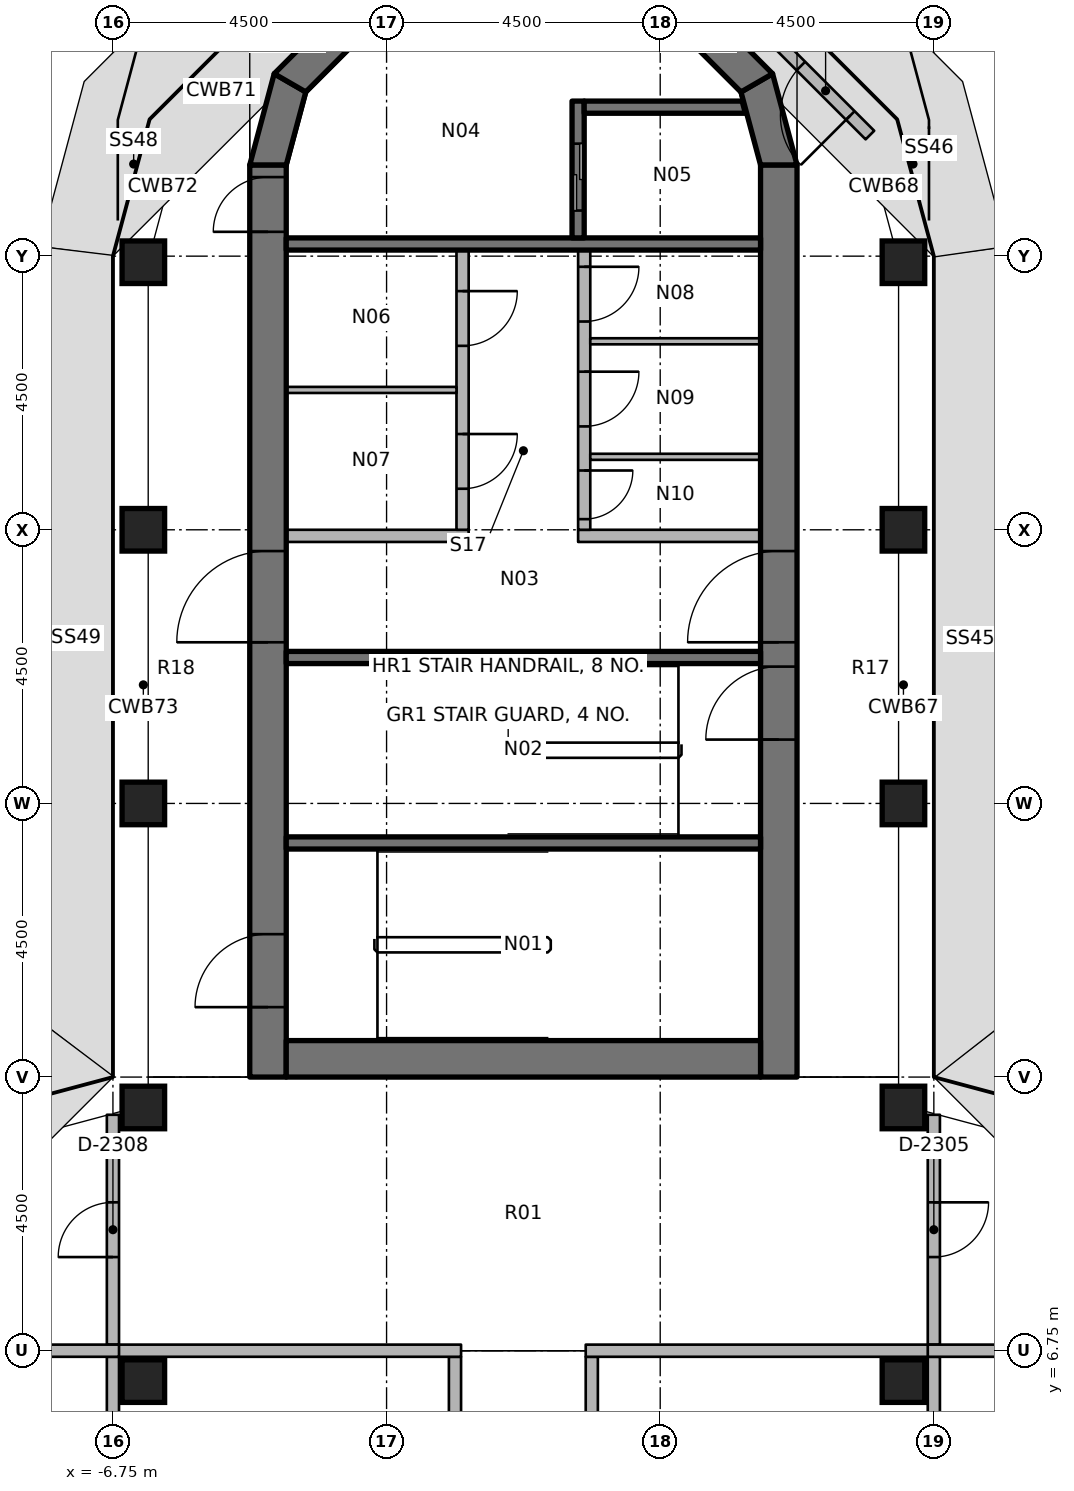
"""IFC4 building model, lengths in metres.
Left out: names, types, materials, properties, quantities, classifications, styles, units other than length and angle.
Written with IfcOpenShell. Run it as: python <this file> out.ifc"""

import sys

from ifc_helpers import new_model, si_unit, direction, frame, frame_2d, origin, origin_2d, place, context, subcontext, project, spatial, polyline, rectangle, outline, extrude, element, fill, save


model = new_model("IFC4")
c1 = context("Model", 3, precision=1e-05, world=origin(), true_north=direction((0.0, 1.0)))
c2 = subcontext(c1, "Body", "Model", "MODEL_VIEW")
j1 = project(units=[si_unit("LENGTHUNIT", "METRE"), si_unit("PLANEANGLEUNIT", "RADIAN")], contexts=[c1])
p1 = place(None, origin())
s1 = spatial("IfcSite", under=j1, at=p1, CompositionType="ELEMENT")
p2 = place(p1, origin())
s2 = spatial("IfcBuilding", under=s1, at=p2, CompositionType="ELEMENT")
p3 = place(p2, frame((0.0, 0.0, 218.2)))
s3 = spatial("IfcBuildingStorey", under=s2, at=p3, CompositionType="ELEMENT", Elevation=218.2)
for number, where, z_axis, x_axis in (
    (1, (-6.25, 6.25, 0.0), (0.0, 0.0, 1.0), (1.0, 0.0, 0.0)),
    (2, (-6.25, 10.75, 0.0), (0.0, 0.0, 1.0), (1.0, 0.0, 0.0)),
    (3, (-6.25, 15.75, 0.0), (0.0, 0.0, 1.0), (1.0, 0.0, 0.0)),
    (4, (-6.25, 20.25, 0.0), (0.0, 0.0, 1.0), (1.0, 0.0, 0.0)),
    (5, (-6.25, 24.65, 0.0), (0.0, 0.0, 1.0), (1.0, 0.0, 0.0)),
    (6, (6.25, 6.25, 0.0), (0.0, 0.0, 1.0), (1.0, 0.0, 0.0)),
    (7, (6.25, 10.75, 0.0), (0.0, 0.0, 1.0), (1.0, 0.0, 0.0)),
    (8, (6.25, 15.75, 0.0), (0.0, 0.0, 1.0), (1.0, 0.0, 0.0)),
    (9, (6.25, 20.25, 0.0), (0.0, 0.0, 1.0), (1.0, 0.0, 0.0)),
    (10, (6.25, 24.65, 0.0), (0.0, 0.0, 1.0), (1.0, 0.0, 0.0)),
):
    element("IfcColumn", number, at=place(p3, frame(where, z_axis=z_axis, x_axis=x_axis)), inside=s3, PredefinedType="COLUMN", context=c2, shape_type="SweptSolid", body=[
        extrude(rectangle(XDim=0.7, YDim=0.7, at=origin_2d()), origin(), (0.0, 0.0, 1.0), 3.65),
    ])
p4 = place(p3, frame((-4.2, 11.25, 0.0), z_axis=(0.0, 0.0, 1.0), x_axis=(0.0, 1.0, 0.0)))
e11 = element("IfcWall", 11, at=p4, inside=s3, PredefinedType="SHEAR", context=c2, shape_type="SweptSolid", body=[
    extrude(rectangle(XDim=15.0, YDim=0.6, at=frame_2d((7.5, 0.0))), origin(), (0.0, 0.0, 1.0), 3.8),
])
p5 = place(p4, frame((7.15, 0.0, 0.0)))
e12 = element("IfcOpeningElement", 12, at=p5, cuts=e11, PredefinedType="OPENING", context=c2, shape_type="SweptSolid", body=[
    extrude(rectangle(XDim=1.5, YDim=2.3, at=frame_2d((0.75, 1.15))), frame((0.0, 0.31, 0.0), z_axis=(0.0, -1.0, 0.0), x_axis=(1.0, 0.0, 0.0)), (0.0, 0.0, 1.0), 0.62),
])
p6 = place(p4, frame((13.9, 0.0, 0.0)))
e13 = element("IfcOpeningElement", 13, at=p6, cuts=e11, PredefinedType="OPENING", context=c2, shape_type="SweptSolid", body=[
    extrude(rectangle(XDim=0.9, YDim=2.1, at=frame_2d((0.45, 1.05))), frame((0.0, 0.31, 0.0), z_axis=(0.0, -1.0, 0.0), x_axis=(1.0, 0.0, 0.0)), (0.0, 0.0, 1.0), 0.62),
])
p7 = place(p4, frame((1.15, 0.0, 0.0)))
e14 = element("IfcOpeningElement", 14, at=p7, cuts=e11, PredefinedType="OPENING", context=c2, shape_type="SweptSolid", body=[
    extrude(rectangle(XDim=1.2, YDim=2.1, at=frame_2d((0.6, 1.05))), frame((0.0, 0.31, 0.0), z_axis=(0.0, -1.0, 0.0), x_axis=(1.0, 0.0, 0.0)), (0.0, 0.0, 1.0), 0.62),
])
p8 = place(p3, frame((4.2, 11.25, 0.0), z_axis=(0.0, 0.0, 1.0), x_axis=(0.0, 1.0, 0.0)))
e15 = element("IfcWall", 15, at=p8, inside=s3, PredefinedType="SHEAR", context=c2, shape_type="SweptSolid", body=[
    extrude(rectangle(XDim=15.0, YDim=0.6, at=frame_2d((7.5, 0.0))), origin(), (0.0, 0.0, 1.0), 3.8),
])
p9 = place(p8, frame((7.15, 0.0, 0.0)))
e16 = element("IfcOpeningElement", 16, at=p9, cuts=e15, PredefinedType="OPENING", context=c2, shape_type="SweptSolid", body=[
    extrude(rectangle(XDim=1.5, YDim=2.3, at=frame_2d((0.75, 1.15))), frame((0.0, 0.31, 0.0), z_axis=(0.0, -1.0, 0.0), x_axis=(1.0, 0.0, 0.0)), (0.0, 0.0, 1.0), 0.62),
])
p10 = place(p8, frame((5.55, 0.0, 0.0)))
e17 = element("IfcOpeningElement", 17, at=p10, cuts=e15, PredefinedType="OPENING", context=c2, shape_type="SweptSolid", body=[
    extrude(rectangle(XDim=1.2, YDim=2.1, at=frame_2d((0.6, 1.05))), frame((0.0, 0.31, 0.0), z_axis=(0.0, -1.0, 0.0), x_axis=(1.0, 0.0, 0.0)), (0.0, 0.0, 1.0), 0.62),
])
p11 = place(p3, frame((-3.9, 11.55, 0.0), z_axis=(0.0, 0.0, 1.0), x_axis=(1.0, 0.0, 0.0)))
e18 = element("IfcWall", 18, at=p11, inside=s3, PredefinedType="SHEAR", context=c2, shape_type="SweptSolid", body=[
    extrude(rectangle(XDim=7.8, YDim=0.6, at=frame_2d((3.9, 0.0))), origin(), (0.0, 0.0, 1.0), 3.8),
])
p12 = place(p3, origin())
e19 = element("IfcWall", 19, at=p12, inside=s3, PredefinedType="SHEAR", context=c2, shape_type="SweptSolid", body=[
    extrude(outline(polyline([(-4.5, 26.25), (-4.098, 27.75), (-3.579, 27.45), (-3.9, 26.25), (-4.5, 26.25)])), origin(), (0.0, 0.0, 1.0), 3.8),
])
p13 = place(p3, origin())
e20 = element("IfcWall", 20, at=p13, inside=s3, PredefinedType="SHEAR", context=c2, shape_type="SweptSolid", body=[
    extrude(outline(polyline([(-4.098, 27.75), (-3.0, 28.848), (-2.7, 28.329), (-3.579, 27.45), (-4.098, 27.75)])), origin(), (0.0, 0.0, 1.0), 3.8),
])
p14 = place(p3, origin())
e21 = element("IfcWall", 21, at=p14, inside=s3, PredefinedType="SHEAR", context=c2, shape_type="SweptSolid", body=[
    extrude(outline(polyline([(4.5, 26.25), (4.098, 27.75), (3.579, 27.45), (3.9, 26.25), (4.5, 26.25)])), origin(), (0.0, 0.0, 1.0), 3.8),
])
p15 = place(p3, origin())
e22 = element("IfcWall", 22, at=p15, inside=s3, PredefinedType="SHEAR", context=c2, shape_type="SweptSolid", body=[
    extrude(outline(polyline([(4.098, 27.75), (3.0, 28.848), (2.7, 28.329), (3.579, 27.45), (4.098, 27.75)])), origin(), (0.0, 0.0, 1.0), 3.8),
])
p16 = place(p3, frame((5.699, 26.741, 0.0), z_axis=(0.0, 0.0, 1.0), x_axis=(-0.707106781187, 0.707106781187, 0.0)))
e23 = element("IfcWall", 23, at=p16, inside=s3, PredefinedType="SOLIDWALL", context=c2, shape_type="SweptSolid", body=[
    extrude(rectangle(XDim=2.061, YDim=0.2, at=frame_2d((1.031, 0.0))), origin(), (0.0, 0.0, 1.0), 2.75),
])
p17 = place(p16, frame((0.456, 0.0, 0.0)))
e24 = element("IfcOpeningElement", 24, at=p17, cuts=e23, PredefinedType="OPENING", context=c2, shape_type="SweptSolid", body=[
    extrude(rectangle(XDim=1.15, YDim=2.4, at=frame_2d((0.575, 1.2))), frame((0.0, 0.11, 0.0), z_axis=(0.0, -1.0, 0.0), x_axis=(1.0, 0.0, 0.0)), (0.0, 0.0, 1.0), 0.22),
])
p18 = place(p3, frame((-3.9, 24.95, 0.0), z_axis=(0.0, 0.0, 1.0), x_axis=(1.0, 0.0, 0.0)))
e25 = element("IfcWall", 25, at=p18, inside=s3, PredefinedType="SHEAR", context=c2, shape_type="SweptSolid", body=[
    extrude(rectangle(XDim=7.8, YDim=0.2, at=frame_2d((3.9, 0.0))), origin(), (0.0, 0.0, 1.0), 3.65),
])
p19 = place(p3, frame((0.9, 27.3, 0.0), z_axis=(0.0, 0.0, 1.0), x_axis=(0.0, -1.0, 0.0)))
e26 = element("IfcWall", 26, at=p19, inside=s3, PredefinedType="SHEAR", context=c2, shape_type="SweptSolid", body=[
    extrude(rectangle(XDim=2.25, YDim=0.2, at=frame_2d((1.125, 0.0))), origin(), (0.0, 0.0, 1.0), 3.65),
])
p20 = place(p19, frame((0.7, 0.0, 0.0)))
e27 = element("IfcOpeningElement", 27, at=p20, cuts=e26, PredefinedType="OPENING", context=c2, shape_type="SweptSolid", body=[
    extrude(rectangle(XDim=1.1, YDim=2.3, at=frame_2d((0.55, 1.15))), frame((0.0, 0.11, 0.0), z_axis=(0.0, -1.0, 0.0), x_axis=(1.0, 0.0, 0.0)), (0.0, 0.0, 1.0), 0.22),
])
p21 = place(p3, origin())
e28 = element("IfcWall", 28, at=p21, inside=s3, PredefinedType="SHEAR", context=c2, shape_type="SweptSolid", body=[
    extrude(outline(polyline([(1.0, 27.1), (3.651, 27.1), (3.597, 27.3), (1.0, 27.3), (1.0, 27.1)])), origin(), (0.0, 0.0, 1.0), 3.65),
])
for number, where, z_axis, x_axis in (
    (29, (-3.9, 18.15, 0.0), (0.0, 0.0, 1.0), (1.0, 0.0, 0.0)),
    (30, (-3.9, 15.1, 0.0), (0.0, 0.0, 1.0), (1.0, 0.0, 0.0)),
):
    element("IfcWall", number, at=place(p3, frame(where, z_axis=z_axis, x_axis=x_axis)), inside=s3, PredefinedType="SHEAR", context=c2, shape_type="SweptSolid", body=[
        extrude(rectangle(XDim=7.8, YDim=0.2, at=frame_2d((3.9, 0.0))), origin(), (0.0, 0.0, 1.0), 3.65),
    ])
p22 = place(p3, frame((-3.9, 20.15, 0.0), z_axis=(0.0, 0.0, 1.0), x_axis=(1.0, 0.0, 0.0)))
e31 = element("IfcWall", 31, at=p22, inside=s3, PredefinedType="PARTITIONING", context=c2, shape_type="SweptSolid", body=[
    extrude(rectangle(XDim=3.0, YDim=0.2, at=frame_2d((1.5, 0.0))), origin(), (0.0, 0.0, 1.0), 3.65),
])
p23 = place(p3, frame((-1.0, 24.85, 0.0), z_axis=(0.0, 0.0, 1.0), x_axis=(0.0, -1.0, 0.0)))
e32 = element("IfcWall", 32, at=p23, inside=s3, PredefinedType="PARTITIONING", context=c2, shape_type="SweptSolid", body=[
    extrude(rectangle(XDim=4.6, YDim=0.2, at=frame_2d((2.3, 0.0))), origin(), (0.0, 0.0, 1.0), 3.65),
])
p24 = place(p23, frame((0.675, 0.0, 0.0)))
e33 = element("IfcOpeningElement", 33, at=p24, cuts=e32, PredefinedType="OPENING", context=c2, shape_type="SweptSolid", body=[
    extrude(rectangle(XDim=0.9, YDim=2.1, at=frame_2d((0.45, 1.05))), frame((0.0, 0.11, 0.0), z_axis=(0.0, -1.0, 0.0), x_axis=(1.0, 0.0, 0.0)), (0.0, 0.0, 1.0), 0.22),
])
p25 = place(p23, frame((3.025, 0.0, 0.0)))
e34 = element("IfcOpeningElement", 34, at=p25, cuts=e32, PredefinedType="OPENING", context=c2, shape_type="SweptSolid", body=[
    extrude(rectangle(XDim=0.9, YDim=2.1, at=frame_2d((0.45, 1.05))), frame((0.0, 0.11, 0.0), z_axis=(0.0, -1.0, 0.0), x_axis=(1.0, 0.0, 0.0)), (0.0, 0.0, 1.0), 0.22),
])
p26 = place(p3, frame((0.9, 20.15, 0.0), z_axis=(0.0, 0.0, 1.0), x_axis=(1.0, 0.0, 0.0)))
e35 = element("IfcWall", 35, at=p26, inside=s3, PredefinedType="PARTITIONING", context=c2, shape_type="SweptSolid", body=[
    extrude(rectangle(XDim=3.0, YDim=0.2, at=frame_2d((1.5, 0.0))), origin(), (0.0, 0.0, 1.0), 3.65),
])
p27 = place(p3, frame((1.0, 24.85, 0.0), z_axis=(0.0, 0.0, 1.0), x_axis=(0.0, -1.0, 0.0)))
e36 = element("IfcWall", 36, at=p27, inside=s3, PredefinedType="PARTITIONING", context=c2, shape_type="SweptSolid", body=[
    extrude(rectangle(XDim=4.6, YDim=0.2, at=frame_2d((2.3, 0.0))), origin(), (0.0, 0.0, 1.0), 3.65),
])
p28 = place(p27, frame((0.275, 0.0, 0.0)))
e37 = element("IfcOpeningElement", 37, at=p28, cuts=e36, PredefinedType="OPENING", context=c2, shape_type="SweptSolid", body=[
    extrude(rectangle(XDim=0.9, YDim=2.1, at=frame_2d((0.45, 1.05))), frame((0.0, 0.11, 0.0), z_axis=(0.0, -1.0, 0.0), x_axis=(1.0, 0.0, 0.0)), (0.0, 0.0, 1.0), 0.22),
])
p29 = place(p27, frame((2.0, 0.0, 0.0)))
e38 = element("IfcOpeningElement", 38, at=p29, cuts=e36, PredefinedType="OPENING", context=c2, shape_type="SweptSolid", body=[
    extrude(rectangle(XDim=0.9, YDim=2.1, at=frame_2d((0.45, 1.05))), frame((0.0, 0.11, 0.0), z_axis=(0.0, -1.0, 0.0), x_axis=(1.0, 0.0, 0.0)), (0.0, 0.0, 1.0), 0.22),
])
p30 = place(p27, frame((3.625, 0.0, 0.0)))
e39 = element("IfcOpeningElement", 39, at=p30, cuts=e36, PredefinedType="OPENING", context=c2, shape_type="SweptSolid", body=[
    extrude(rectangle(XDim=0.8, YDim=2.1, at=frame_2d((0.4, 1.05))), frame((0.0, 0.11, 0.0), z_axis=(0.0, -1.0, 0.0), x_axis=(1.0, 0.0, 0.0)), (0.0, 0.0, 1.0), 0.22),
])
for number, where, z_axis, x_axis in (
    (40, (-3.9, 22.55, 0.0), (0.0, 0.0, 1.0), (1.0, 0.0, 0.0)),
    (41, (1.1, 23.35, 0.0), (0.0, 0.0, 1.0), (1.0, 0.0, 0.0)),
    (42, (1.1, 21.45, 0.0), (0.0, 0.0, 1.0), (1.0, 0.0, 0.0)),
):
    element("IfcWall", number, at=place(p3, frame(where, z_axis=z_axis, x_axis=x_axis)), inside=s3, PredefinedType="PARTITIONING", context=c2, shape_type="SweptSolid", body=[
        extrude(rectangle(XDim=2.8, YDim=0.1, at=frame_2d((1.4, 0.0))), origin(), (0.0, 0.0, 1.0), 3.65),
    ])
for number, where, z_axis, x_axis in (
    (43, (1.125, 0.1, 0.0), (0.0, 0.0, 1.0), (0.0, 1.0, 0.0)),
    (44, (-1.125, 0.1, 0.0), (0.0, 0.0, 1.0), (0.0, 1.0, 0.0)),
):
    element("IfcWall", number, at=place(p3, frame(where, z_axis=z_axis, x_axis=x_axis)), inside=s3, PredefinedType="PARTITIONING", context=c2, shape_type="SweptSolid", body=[
        extrude(rectangle(XDim=6.55, YDim=0.2, at=frame_2d((3.275, 0.0))), origin(), (0.0, 0.0, 1.0), 2.75),
    ])
p31 = place(p3, frame((1.025, 6.75, 0.0), z_axis=(0.0, 0.0, 1.0), x_axis=(1.0, 0.0, 0.0)))
e45 = element("IfcWall", 45, at=p31, inside=s3, PredefinedType="PARTITIONING", context=c2, shape_type="SweptSolid", body=[
    extrude(rectangle(XDim=5.825, YDim=0.2, at=frame_2d((2.913, 0.0))), origin(), (0.0, 0.0, 1.0), 2.75),
])
p32 = place(p3, frame((6.75, 10.63, 0.0), z_axis=(0.0, 0.0, 1.0), x_axis=(0.0, -1.0, 0.0)))
e46 = element("IfcWall", 46, at=p32, inside=s3, PredefinedType="PARTITIONING", context=c2, shape_type="SweptSolid", body=[
    extrude(rectangle(XDim=3.78, YDim=0.2, at=frame_2d((1.89, 0.0))), origin(), (0.0, 0.0, 1.0), 2.75),
])
p33 = place(p32, frame((1.44, 0.0, 0.0)))
e47 = element("IfcOpeningElement", 47, at=p33, cuts=e46, PredefinedType="OPENING", context=c2, shape_type="SweptSolid", body=[
    extrude(rectangle(XDim=0.9, YDim=2.1, at=frame_2d((0.45, 1.05))), frame((0.0, 0.11, 0.0), z_axis=(0.0, -1.0, 0.0), x_axis=(1.0, 0.0, 0.0)), (0.0, 0.0, 1.0), 0.22),
])
p34 = place(p3, frame((-6.85, 6.75, 0.0), z_axis=(0.0, 0.0, 1.0), x_axis=(1.0, 0.0, 0.0)))
e48 = element("IfcWall", 48, at=p34, inside=s3, PredefinedType="PARTITIONING", context=c2, shape_type="SweptSolid", body=[
    extrude(rectangle(XDim=5.825, YDim=0.2, at=frame_2d((2.913, 0.0))), origin(), (0.0, 0.0, 1.0), 2.75),
])
p35 = place(p3, frame((-6.75, 6.85, 0.0), z_axis=(0.0, 0.0, 1.0), x_axis=(0.0, 1.0, 0.0)))
e49 = element("IfcWall", 49, at=p35, inside=s3, PredefinedType="PARTITIONING", context=c2, shape_type="SweptSolid", body=[
    extrude(rectangle(XDim=3.78, YDim=0.2, at=frame_2d((1.89, 0.0))), origin(), (0.0, 0.0, 1.0), 2.75),
])
p36 = place(p35, frame((1.44, 0.0, 0.0)))
e50 = element("IfcOpeningElement", 50, at=p36, cuts=e49, PredefinedType="OPENING", context=c2, shape_type="SweptSolid", body=[
    extrude(rectangle(XDim=0.9, YDim=2.1, at=frame_2d((0.45, 1.05))), frame((0.0, 0.11, 0.0), z_axis=(0.0, -1.0, 0.0), x_axis=(1.0, 0.0, 0.0)), (0.0, 0.0, 1.0), 0.22),
])
p37 = place(p3, frame((6.75, 0.1, 0.0), z_axis=(0.0, 0.0, 1.0), x_axis=(0.0, 1.0, 0.0)))
e51 = element("IfcWall", 51, at=p37, inside=s3, PredefinedType="PARTITIONING", context=c2, shape_type="SweptSolid", body=[
    extrude(rectangle(XDim=6.55, YDim=0.2, at=frame_2d((3.275, 0.0))), origin(), (0.0, 0.0, 1.0), 2.75),
])
p38 = place(p3, frame((6.65, 6.75, 0.0), z_axis=(0.0, 0.0, 1.0), x_axis=(1.0, 0.0, 0.0)))
e52 = element("IfcWall", 52, at=p38, inside=s3, PredefinedType="PARTITIONING", context=c2, shape_type="SweptSolid", body=[
    extrude(rectangle(XDim=4.7, YDim=0.2, at=frame_2d((2.35, 0.0))), origin(), (0.0, 0.0, 1.0), 2.75),
])
p39 = place(p3, frame((-6.75, 0.1, 0.0), z_axis=(0.0, 0.0, 1.0), x_axis=(0.0, 1.0, 0.0)))
e53 = element("IfcWall", 53, at=p39, inside=s3, PredefinedType="PARTITIONING", context=c2, shape_type="SweptSolid", body=[
    extrude(rectangle(XDim=6.55, YDim=0.2, at=frame_2d((3.275, 0.0))), origin(), (0.0, 0.0, 1.0), 2.75),
])
p40 = place(p3, frame((-11.35, 6.75, 0.0), z_axis=(0.0, 0.0, 1.0), x_axis=(1.0, 0.0, 0.0)))
e54 = element("IfcWall", 54, at=p40, inside=s3, PredefinedType="PARTITIONING", context=c2, shape_type="SweptSolid", body=[
    extrude(rectangle(XDim=4.7, YDim=0.2, at=frame_2d((2.35, 0.0))), origin(), (0.0, 0.0, 1.0), 2.75),
])
p41 = place(p17, origin())
e55 = element("IfcDoor", 55, at=p41, inside=s3, OperationType="SINGLE_SWING_LEFT", PredefinedType="DOOR", context=c2, shape_type="SweptSolid", body=[
    extrude(rectangle(XDim=1.15, YDim=2.4, at=frame_2d((0.575, 1.2))), frame((0.0, 0.025, 0.0), z_axis=(0.0, -1.0, 0.0), x_axis=(1.0, 0.0, 0.0)), (0.0, 0.0, 1.0), 0.05),
])
fill(e24, e55)
p42 = place(p5, origin())
e56 = element("IfcDoor", 56, at=p42, inside=s3, OperationType="DOUBLE_DOOR_SINGLE_SWING", PredefinedType="DOOR", context=c2, shape_type="SweptSolid", body=[
    extrude(rectangle(XDim=1.5, YDim=2.3, at=frame_2d((0.75, 1.15))), frame((0.0, 0.025, 0.0), z_axis=(0.0, -1.0, 0.0), x_axis=(1.0, 0.0, 0.0)), (0.0, 0.0, 1.0), 0.05),
])
fill(e12, e56)
p43 = place(p9, origin())
e57 = element("IfcDoor", 57, at=p43, inside=s3, OperationType="DOUBLE_DOOR_SINGLE_SWING", PredefinedType="DOOR", context=c2, shape_type="SweptSolid", body=[
    extrude(rectangle(XDim=1.5, YDim=2.3, at=frame_2d((0.75, 1.15))), frame((0.0, 0.025, 0.0), z_axis=(0.0, -1.0, 0.0), x_axis=(1.0, 0.0, 0.0)), (0.0, 0.0, 1.0), 0.05),
])
fill(e16, e57)
p44 = place(p6, origin())
e58 = element("IfcDoor", 58, at=p44, inside=s3, OperationType="SINGLE_SWING_RIGHT", PredefinedType="DOOR", context=c2, shape_type="SweptSolid", body=[
    extrude(rectangle(XDim=0.9, YDim=2.1, at=frame_2d((0.45, 1.05))), frame((0.0, 0.025, 0.0), z_axis=(0.0, -1.0, 0.0), x_axis=(1.0, 0.0, 0.0)), (0.0, 0.0, 1.0), 0.05),
])
fill(e13, e58)
p45 = place(p10, origin())
e59 = element("IfcDoor", 59, at=p45, inside=s3, OperationType="SINGLE_SWING_LEFT", PredefinedType="DOOR", context=c2, shape_type="SweptSolid", body=[
    extrude(rectangle(XDim=1.2, YDim=2.1, at=frame_2d((0.6, 1.05))), frame((0.0, 0.025, 0.0), z_axis=(0.0, -1.0, 0.0), x_axis=(1.0, 0.0, 0.0)), (0.0, 0.0, 1.0), 0.05),
])
fill(e17, e59)
p46 = place(p7, origin())
e60 = element("IfcDoor", 60, at=p46, inside=s3, OperationType="SINGLE_SWING_RIGHT", PredefinedType="DOOR", context=c2, shape_type="SweptSolid", body=[
    extrude(rectangle(XDim=1.2, YDim=2.1, at=frame_2d((0.6, 1.05))), frame((0.0, 0.025, 0.0), z_axis=(0.0, -1.0, 0.0), x_axis=(1.0, 0.0, 0.0)), (0.0, 0.0, 1.0), 0.05),
])
fill(e14, e60)
p47 = place(p20, origin())
e61 = element("IfcDoor", 61, at=p47, inside=s3, OperationType="DOUBLE_DOOR_SLIDING", PredefinedType="DOOR", context=c2, shape_type="SweptSolid", body=[
    extrude(rectangle(XDim=1.1, YDim=2.3, at=frame_2d((0.55, 1.15))), frame((0.0, 0.025, 0.0), z_axis=(0.0, -1.0, 0.0), x_axis=(1.0, 0.0, 0.0)), (0.0, 0.0, 1.0), 0.05),
])
fill(e27, e61)
p48 = place(p24, origin())
e62 = element("IfcDoor", 62, at=p48, inside=s3, OperationType="SINGLE_SWING_LEFT", PredefinedType="DOOR", context=c2, shape_type="SweptSolid", body=[
    extrude(rectangle(XDim=0.9, YDim=2.1, at=frame_2d((0.45, 1.05))), frame((0.0, 0.025, 0.0), z_axis=(0.0, -1.0, 0.0), x_axis=(1.0, 0.0, 0.0)), (0.0, 0.0, 1.0), 0.05),
])
fill(e33, e62)
p49 = place(p25, origin())
e63 = element("IfcDoor", 63, at=p49, inside=s3, OperationType="SINGLE_SWING_RIGHT", PredefinedType="DOOR", context=c2, shape_type="SweptSolid", body=[
    extrude(rectangle(XDim=0.9, YDim=2.1, at=frame_2d((0.45, 1.05))), frame((0.0, 0.025, 0.0), z_axis=(0.0, -1.0, 0.0), x_axis=(1.0, 0.0, 0.0)), (0.0, 0.0, 1.0), 0.05),
])
fill(e34, e63)
p50 = place(p28, origin())
e64 = element("IfcDoor", 64, at=p50, inside=s3, OperationType="SINGLE_SWING_LEFT", PredefinedType="DOOR", context=c2, shape_type="SweptSolid", body=[
    extrude(rectangle(XDim=0.9, YDim=2.1, at=frame_2d((0.45, 1.05))), frame((0.0, 0.025, 0.0), z_axis=(0.0, -1.0, 0.0), x_axis=(1.0, 0.0, 0.0)), (0.0, 0.0, 1.0), 0.05),
])
fill(e37, e64)
p51 = place(p29, origin())
e65 = element("IfcDoor", 65, at=p51, inside=s3, OperationType="SINGLE_SWING_LEFT", PredefinedType="DOOR", context=c2, shape_type="SweptSolid", body=[
    extrude(rectangle(XDim=0.9, YDim=2.1, at=frame_2d((0.45, 1.05))), frame((0.0, 0.025, 0.0), z_axis=(0.0, -1.0, 0.0), x_axis=(1.0, 0.0, 0.0)), (0.0, 0.0, 1.0), 0.05),
])
fill(e38, e65)
p52 = place(p30, origin())
e66 = element("IfcDoor", 66, at=p52, inside=s3, OperationType="SINGLE_SWING_LEFT", PredefinedType="DOOR", context=c2, shape_type="SweptSolid", body=[
    extrude(rectangle(XDim=0.8, YDim=2.1, at=frame_2d((0.4, 1.05))), frame((0.0, 0.025, 0.0), z_axis=(0.0, -1.0, 0.0), x_axis=(1.0, 0.0, 0.0)), (0.0, 0.0, 1.0), 0.05),
])
fill(e39, e66)
p53 = place(p33, origin())
e67 = element("IfcDoor", 67, at=p53, inside=s3, OperationType="SINGLE_SWING_RIGHT", PredefinedType="DOOR", context=c2, shape_type="SweptSolid", body=[
    extrude(rectangle(XDim=0.9, YDim=2.1, at=frame_2d((0.45, 1.05))), frame((0.0, 0.025, 0.0), z_axis=(0.0, -1.0, 0.0), x_axis=(1.0, 0.0, 0.0)), (0.0, 0.0, 1.0), 0.05),
])
fill(e47, e67)
p54 = place(p36, origin())
e68 = element("IfcDoor", 68, at=p54, inside=s3, OperationType="SINGLE_SWING_LEFT", PredefinedType="DOOR", context=c2, shape_type="SweptSolid", body=[
    extrude(rectangle(XDim=0.9, YDim=2.1, at=frame_2d((0.45, 1.05))), frame((0.0, 0.025, 0.0), z_axis=(0.0, -1.0, 0.0), x_axis=(1.0, 0.0, 0.0)), (0.0, 0.0, 1.0), 0.05),
])
fill(e50, e68)
save(model, sys.argv[1])
